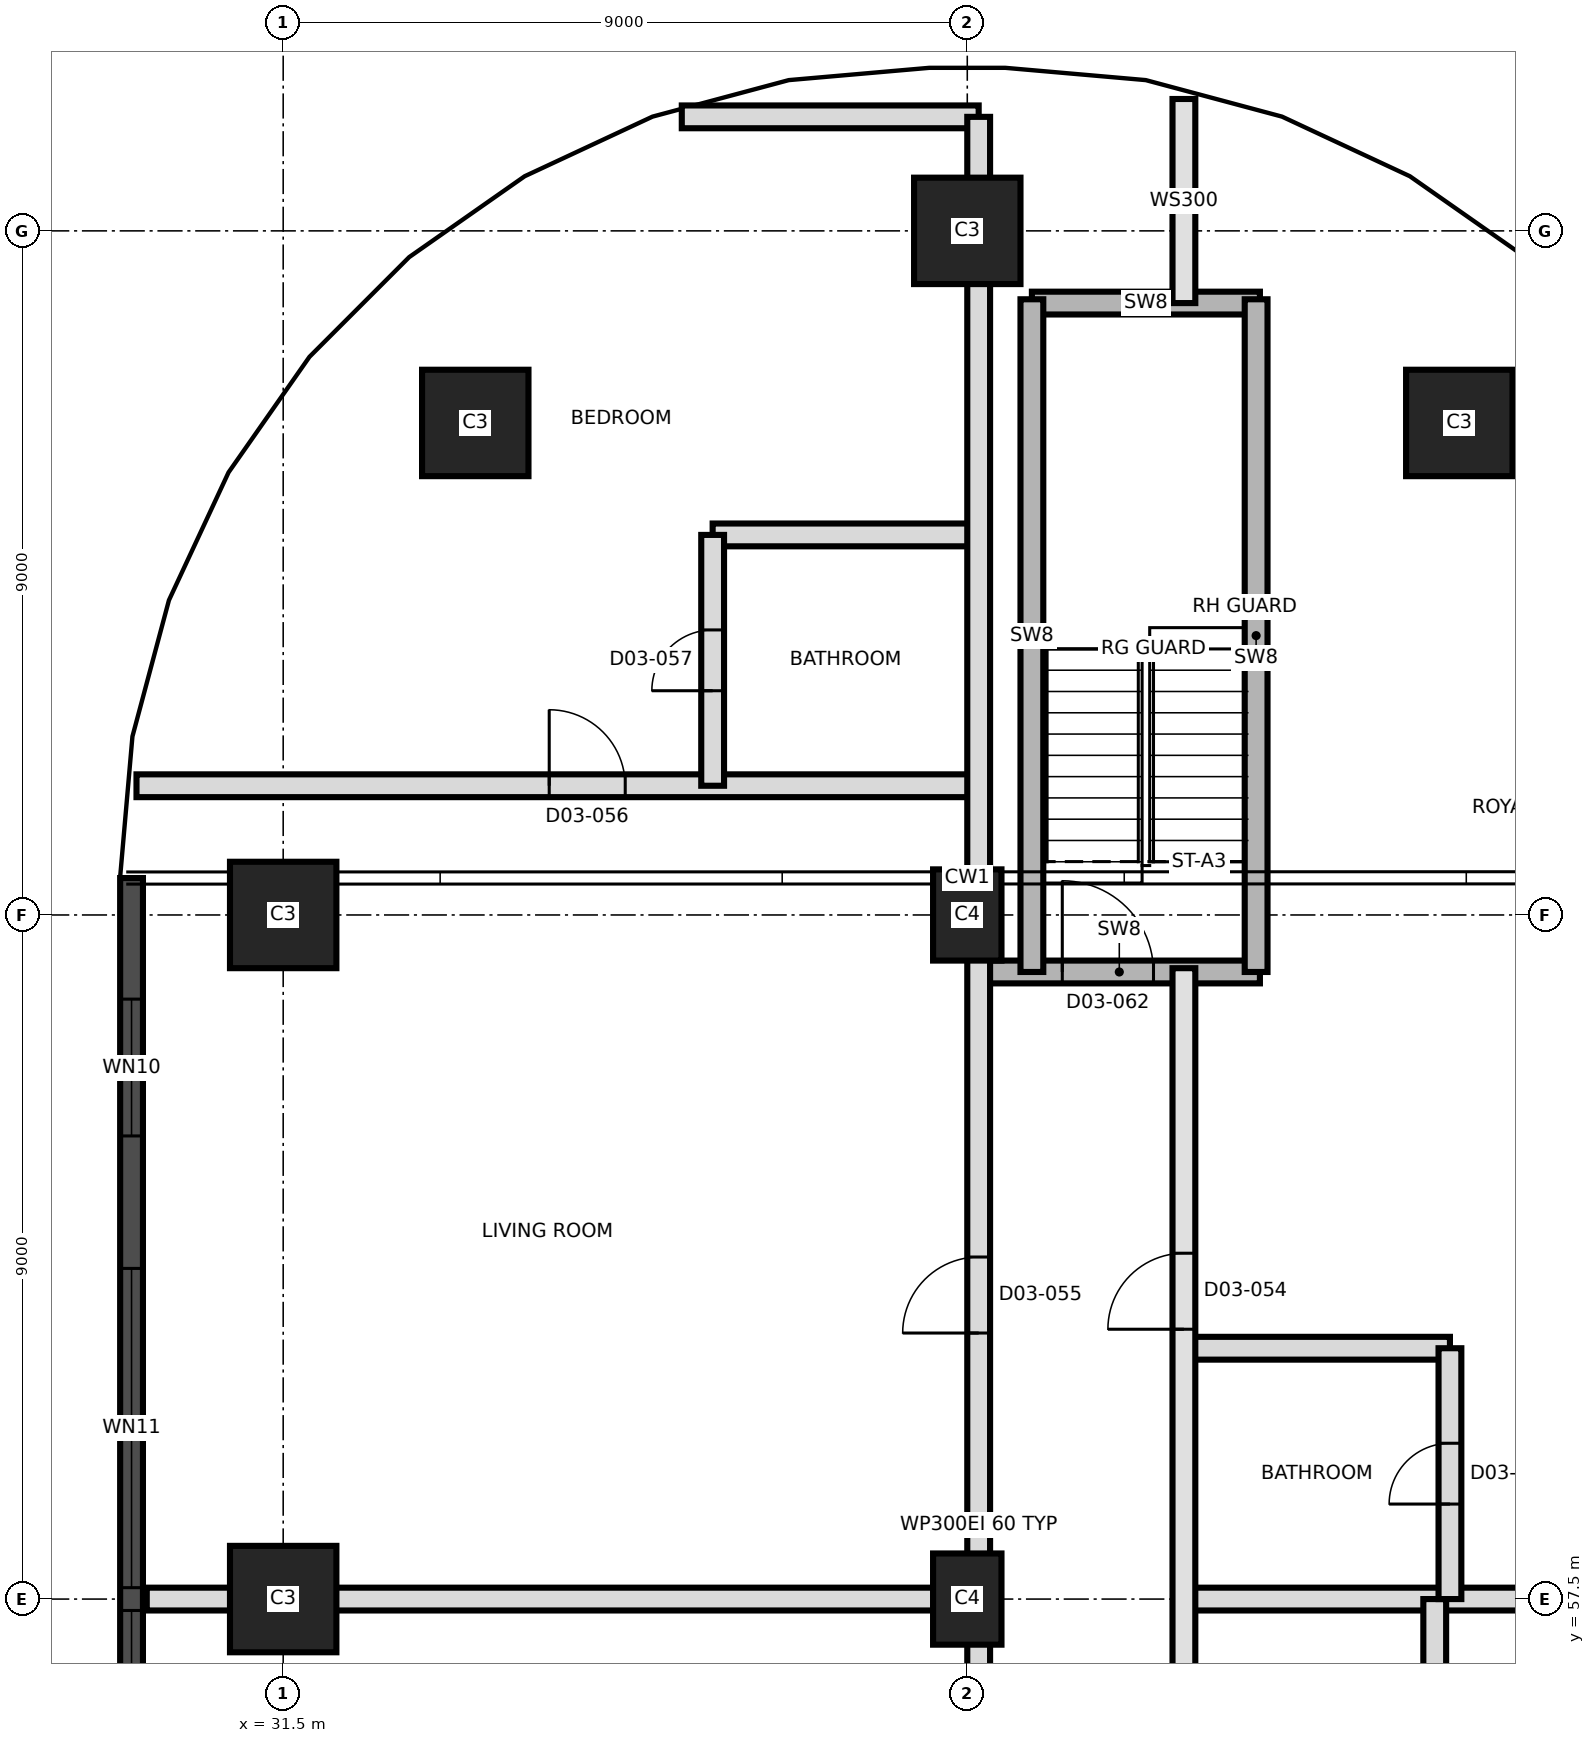
"""IFC4 building model, lengths in metres.
Left out: names, types, materials, properties, quantities, classifications, styles, units other than length and angle.
Written with IfcOpenShell. Run it as: python <this file> out.ifc"""

import sys

from ifc_helpers import new_model, si_unit, direction, frame, frame_2d, origin, origin_2d, place, context, subcontext, project, spatial, rectangle, extrude, element, fill, save


model = new_model("IFC4")
c1 = context("Model", 3, precision=1e-05, world=origin(), true_north=direction((0.0, 1.0)))
c2 = subcontext(c1, "Body", "Model", "MODEL_VIEW")
j1 = project(units=[si_unit("LENGTHUNIT", "METRE"), si_unit("PLANEANGLEUNIT", "RADIAN")], contexts=[c1])
p1 = place(None, origin())
s1 = spatial("IfcSite", under=j1, at=p1, CompositionType="ELEMENT")
p2 = place(p1, origin())
s2 = spatial("IfcBuilding", under=s1, at=p2, CompositionType="ELEMENT")
p3 = place(p2, frame((0.0, 0.0, 59.4)))
s3 = spatial("IfcBuildingStorey", under=s2, at=p3, CompositionType="ELEMENT", Elevation=59.4)
p4 = place(p3, frame((31.5, 57.5, 0.0), z_axis=(0.0, 0.0, 1.0), x_axis=(1.0, 0.0, 0.0)))
e1 = element("IfcColumn", 1, at=p4, inside=s3, PredefinedType="COLUMN", context=c2, shape_type="SweptSolid", body=[
    extrude(rectangle(XDim=1.4, YDim=1.4, at=origin_2d()), origin(), (0.0, 0.0, 1.0), 3.7),
])
p5 = place(p3, frame((40.5, 57.5, 0.0), z_axis=(0.0, 0.0, 1.0), x_axis=(0.0, 1.0, 0.0)))
e2 = element("IfcColumn", 2, at=p5, inside=s3, PredefinedType="COLUMN", context=c2, shape_type="SweptSolid", body=[
    extrude(rectangle(XDim=1.2, YDim=0.9, at=origin_2d()), origin(), (0.0, 0.0, 1.0), 3.7),
])
p6 = place(p3, frame((31.5, 66.5, 0.0), z_axis=(0.0, 0.0, 1.0), x_axis=(1.0, 0.0, 0.0)))
e3 = element("IfcColumn", 3, at=p6, inside=s3, PredefinedType="COLUMN", context=c2, shape_type="SweptSolid", body=[
    extrude(rectangle(XDim=1.4, YDim=1.4, at=origin_2d()), origin(), (0.0, 0.0, 1.0), 3.7),
])
p7 = place(p3, frame((40.5, 66.5, 0.0), z_axis=(0.0, 0.0, 1.0), x_axis=(0.0, 1.0, 0.0)))
e4 = element("IfcColumn", 4, at=p7, inside=s3, PredefinedType="COLUMN", context=c2, shape_type="SweptSolid", body=[
    extrude(rectangle(XDim=1.2, YDim=0.9, at=origin_2d()), origin(), (0.0, 0.0, 1.0), 3.7),
])
for number, where, z_axis, x_axis in (
    (5, (34.027, 72.973, 0.0), (0.0, 0.0, 1.0), (1.0, 0.0, 0.0)),
    (6, (46.973, 72.973, 0.0), (0.0, 0.0, 1.0), (1.0, 0.0, 0.0)),
    (7, (40.5, 75.5, 0.0), (0.0, 0.0, 1.0), (1.0, 0.0, 0.0)),
):
    element("IfcColumn", number, at=place(p3, frame(where, z_axis=z_axis, x_axis=x_axis)), inside=s3, PredefinedType="COLUMN", context=c2, shape_type="SweptSolid", body=[
        extrude(rectangle(XDim=1.4, YDim=1.4, at=origin_2d()), origin(), (0.0, 0.0, 1.0), 3.7),
    ])
p8 = place(p3, frame((29.505, 66.986, 0.0), z_axis=(0.0, 0.0, 1.0), x_axis=(0.0, -1.0, 0.0)))
e8 = element("IfcWall", 8, at=p8, inside=s3, PredefinedType="SOLIDWALL", context=c2, shape_type="SweptSolid", body=[
    extrude(rectangle(XDim=32.976, YDim=0.3, at=frame_2d((16.488, 0.0))), origin(), (0.0, 0.0, 1.0), 3.4),
])
p9 = place(p8, frame((1.593, 0.0, 0.3)))
e9 = element("IfcOpeningElement", 9, at=p9, cuts=e8, PredefinedType="OPENING", context=c2, shape_type="SweptSolid", body=[
    extrude(rectangle(XDim=1.8, YDim=2.4, at=frame_2d((0.9, 1.2))), frame((0.0, 0.16, 0.0), z_axis=(0.0, -1.0, 0.0), x_axis=(1.0, 0.0, 0.0)), (0.0, 0.0, 1.0), 0.32),
])
p10 = place(p8, frame((5.136, 0.0, 0.9)))
e10 = element("IfcOpeningElement", 10, at=p10, cuts=e8, PredefinedType="OPENING", context=c2, shape_type="SweptSolid", body=[
    extrude(rectangle(XDim=4.2, YDim=1.5, at=frame_2d((2.1, 0.75))), frame((0.0, 0.16, 0.0), z_axis=(0.0, -1.0, 0.0), x_axis=(1.0, 0.0, 0.0)), (0.0, 0.0, 1.0), 0.32),
])
p11 = place(p8, frame((9.636, 0.0, 0.9)))
e11 = element("IfcOpeningElement", 11, at=p11, cuts=e8, PredefinedType="OPENING", context=c2, shape_type="SweptSolid", body=[
    extrude(rectangle(XDim=4.2, YDim=1.5, at=frame_2d((2.1, 0.75))), frame((0.0, 0.16, 0.0), z_axis=(0.0, -1.0, 0.0), x_axis=(1.0, 0.0, 0.0)), (0.0, 0.0, 1.0), 0.32),
])
p12 = place(p8, frame((14.136, 0.0, 0.9)))
e12 = element("IfcOpeningElement", 12, at=p12, cuts=e8, PredefinedType="OPENING", context=c2, shape_type="SweptSolid", body=[
    extrude(rectangle(XDim=4.2, YDim=1.5, at=frame_2d((2.1, 0.75))), frame((0.0, 0.16, 0.0), z_axis=(0.0, -1.0, 0.0), x_axis=(1.0, 0.0, 0.0)), (0.0, 0.0, 1.0), 0.32),
])
p13 = place(p8, frame((18.636, 0.0, 0.9)))
e13 = element("IfcOpeningElement", 13, at=p13, cuts=e8, PredefinedType="OPENING", context=c2, shape_type="SweptSolid", body=[
    extrude(rectangle(XDim=4.2, YDim=1.5, at=frame_2d((2.1, 0.75))), frame((0.0, 0.16, 0.0), z_axis=(0.0, -1.0, 0.0), x_axis=(1.0, 0.0, 0.0)), (0.0, 0.0, 1.0), 0.32),
])
p14 = place(p8, frame((23.136, 0.0, 0.9)))
e14 = element("IfcOpeningElement", 14, at=p14, cuts=e8, PredefinedType="OPENING", context=c2, shape_type="SweptSolid", body=[
    extrude(rectangle(XDim=4.2, YDim=1.5, at=frame_2d((2.1, 0.75))), frame((0.0, 0.16, 0.0), z_axis=(0.0, -1.0, 0.0), x_axis=(1.0, 0.0, 0.0)), (0.0, 0.0, 1.0), 0.32),
])
p15 = place(p8, frame((29.331, 0.0, 0.3)))
e15 = element("IfcOpeningElement", 15, at=p15, cuts=e8, PredefinedType="OPENING", context=c2, shape_type="SweptSolid", body=[
    extrude(rectangle(XDim=1.8, YDim=2.4, at=frame_2d((0.9, 1.2))), frame((0.0, 0.16, 0.0), z_axis=(0.0, -1.0, 0.0), x_axis=(1.0, 0.0, 0.0)), (0.0, 0.0, 1.0), 0.32),
])
p16 = place(p3, frame((29.705, 57.5, 0.0), z_axis=(0.0, 0.0, 1.0), x_axis=(1.0, 0.0, 0.0)))
e16 = element("IfcWall", 16, at=p16, inside=s3, PredefinedType="PARTITIONING", context=c2, shape_type="SweptSolid", body=[
    extrude(rectangle(XDim=10.945, YDim=0.3, at=frame_2d((5.472, 0.0))), origin(), (0.0, 0.0, 1.0), 3.4),
])
p17 = place(p3, frame((43.35, 57.5, 0.0), z_axis=(0.0, 0.0, 1.0), x_axis=(1.0, 0.0, 0.0)))
e17 = element("IfcWall", 17, at=p17, inside=s3, PredefinedType="PARTITIONING", context=c2, shape_type="SweptSolid", body=[
    extrude(rectangle(XDim=8.125, YDim=0.3, at=frame_2d((4.062, 0.0))), origin(), (0.0, 0.0, 1.0), 3.4),
])
p18 = place(p3, frame((43.35, 60.8, 0.0), z_axis=(0.0, 0.0, 1.0), x_axis=(1.0, 0.0, 0.0)))
e18 = element("IfcWall", 18, at=p18, inside=s3, PredefinedType="PARTITIONING", context=c2, shape_type="SweptSolid", body=[
    extrude(rectangle(XDim=3.5, YDim=0.3, at=frame_2d((1.75, 0.0))), origin(), (0.0, 0.0, 1.0), 3.4),
])
p19 = place(p3, frame((40.65, 65.75, 0.0), z_axis=(0.0, 0.0, 1.0), x_axis=(1.0, 0.0, 0.0)))
e19 = element("IfcWall", 19, at=p19, inside=s3, PredefinedType="SHEAR", context=c2, shape_type="SweptSolid", body=[
    extrude(rectangle(XDim=3.7, YDim=0.3, at=frame_2d((1.85, 0.0))), origin(), (0.0, 0.0, 1.0), 3.4),
])
p20 = place(p19, frame((1.1, 0.0, 0.0)))
e20 = element("IfcOpeningElement", 20, at=p20, cuts=e19, PredefinedType="OPENING", context=c2, shape_type="SweptSolid", body=[
    extrude(rectangle(XDim=1.2, YDim=2.1, at=frame_2d((0.6, 1.05))), frame((0.0, 0.16, 0.0), z_axis=(0.0, -1.0, 0.0), x_axis=(1.0, 0.0, 0.0)), (0.0, 0.0, 1.0), 0.32),
])
p21 = place(p3, frame((29.57, 68.2, 0.0), z_axis=(0.0, 0.0, 1.0), x_axis=(1.0, 0.0, 0.0)))
e21 = element("IfcWall", 21, at=p21, inside=s3, PredefinedType="PARTITIONING", context=c2, shape_type="SweptSolid", body=[
    extrude(rectangle(XDim=11.08, YDim=0.3, at=frame_2d((5.54, 0.0))), origin(), (0.0, 0.0, 1.0), 3.4),
])
p22 = place(p21, frame((5.43, 0.0, 0.0)))
e22 = element("IfcOpeningElement", 22, at=p22, cuts=e21, PredefinedType="OPENING", context=c2, shape_type="SweptSolid", body=[
    extrude(rectangle(XDim=1.0, YDim=2.1, at=frame_2d((0.5, 1.05))), frame((0.0, 0.16, 0.0), z_axis=(0.0, -1.0, 0.0), x_axis=(1.0, 0.0, 0.0)), (0.0, 0.0, 1.0), 0.32),
])
p23 = place(p3, frame((37.15, 71.5, 0.0), z_axis=(0.0, 0.0, 1.0), x_axis=(1.0, 0.0, 0.0)))
e23 = element("IfcWall", 23, at=p23, inside=s3, PredefinedType="PARTITIONING", context=c2, shape_type="SweptSolid", body=[
    extrude(rectangle(XDim=3.5, YDim=0.3, at=frame_2d((1.75, 0.0))), origin(), (0.0, 0.0, 1.0), 3.4),
])
p24 = place(p3, frame((41.35, 74.55, 0.0), z_axis=(0.0, 0.0, 1.0), x_axis=(1.0, 0.0, 0.0)))
e24 = element("IfcWall", 24, at=p24, inside=s3, PredefinedType="SHEAR", context=c2, shape_type="SweptSolid", body=[
    extrude(rectangle(XDim=3.0, YDim=0.3, at=frame_2d((1.5, 0.0))), origin(), (0.0, 0.0, 1.0), 3.4),
])
p25 = place(p3, frame((36.744, 77.0, 0.0), z_axis=(0.0, 0.0, 1.0), x_axis=(1.0, 0.0, 0.0)))
e25 = element("IfcWall", 25, at=p25, inside=s3, PredefinedType="PARTITIONING", context=c2, shape_type="SweptSolid", body=[
    extrude(rectangle(XDim=3.906, YDim=0.3, at=frame_2d((1.953, 0.0))), origin(), (0.0, 0.0, 1.0), 3.4),
])
p26 = place(p3, frame((37.15, 68.2, 0.0), z_axis=(0.0, 0.0, 1.0), x_axis=(0.0, 1.0, 0.0)))
e26 = element("IfcWall", 26, at=p26, inside=s3, PredefinedType="PARTITIONING", context=c2, shape_type="SweptSolid", body=[
    extrude(rectangle(XDim=3.3, YDim=0.3, at=frame_2d((1.65, 0.0))), origin(), (0.0, 0.0, 1.0), 3.4),
])
p27 = place(p26, frame((1.25, 0.0, 0.0)))
e27 = element("IfcOpeningElement", 27, at=p27, cuts=e26, PredefinedType="OPENING", context=c2, shape_type="SweptSolid", body=[
    extrude(rectangle(XDim=0.8, YDim=2.1, at=frame_2d((0.4, 1.05))), frame((0.0, 0.16, 0.0), z_axis=(0.0, -1.0, 0.0), x_axis=(1.0, 0.0, 0.0)), (0.0, 0.0, 1.0), 0.32),
])
p28 = place(p3, frame((40.65, 39.95, 0.0), z_axis=(0.0, 0.0, 1.0), x_axis=(0.0, 1.0, 0.0)))
e28 = element("IfcWall", 28, at=p28, inside=s3, PredefinedType="PARTITIONING", context=c2, shape_type="SweptSolid", body=[
    extrude(rectangle(XDim=37.05, YDim=0.3, at=frame_2d((18.525, 0.0))), origin(), (0.0, 0.0, 1.0), 3.4),
])
p29 = place(p28, frame((1.9, 0.0, 0.0)))
e29 = element("IfcOpeningElement", 29, at=p29, cuts=e28, PredefinedType="OPENING", context=c2, shape_type="SweptSolid", body=[
    extrude(rectangle(XDim=1.0, YDim=2.4, at=frame_2d((0.5, 1.2))), frame((0.0, 0.16, 0.0), z_axis=(0.0, -1.0, 0.0), x_axis=(1.0, 0.0, 0.0)), (0.0, 0.0, 1.0), 0.32),
])
p30 = place(p28, frame((14.2, 0.0, 0.0)))
e30 = element("IfcOpeningElement", 30, at=p30, cuts=e28, PredefinedType="OPENING", context=c2, shape_type="SweptSolid", body=[
    extrude(rectangle(XDim=1.0, YDim=2.4, at=frame_2d((0.5, 1.2))), frame((0.0, 0.16, 0.0), z_axis=(0.0, -1.0, 0.0), x_axis=(1.0, 0.0, 0.0)), (0.0, 0.0, 1.0), 0.32),
])
p31 = place(p28, frame((21.05, 0.0, 0.0)))
e31 = element("IfcOpeningElement", 31, at=p31, cuts=e28, PredefinedType="OPENING", context=c2, shape_type="SweptSolid", body=[
    extrude(rectangle(XDim=1.0, YDim=2.4, at=frame_2d((0.5, 1.2))), frame((0.0, 0.16, 0.0), z_axis=(0.0, -1.0, 0.0), x_axis=(1.0, 0.0, 0.0)), (0.0, 0.0, 1.0), 0.32),
])
p32 = place(p3, frame((41.35, 65.75, 0.0), z_axis=(0.0, 0.0, 1.0), x_axis=(0.0, 1.0, 0.0)))
e32 = element("IfcWall", 32, at=p32, inside=s3, PredefinedType="SHEAR", context=c2, shape_type="SweptSolid", body=[
    extrude(rectangle(XDim=8.85, YDim=0.3, at=frame_2d((4.425, 0.0))), origin(), (0.0, 0.0, 1.0), 3.4),
])
p33 = place(p3, frame((43.35, 39.95, 0.0), z_axis=(0.0, 0.0, 1.0), x_axis=(0.0, 1.0, 0.0)))
e33 = element("IfcWall", 33, at=p33, inside=s3, PredefinedType="SOLIDWALL", context=c2, shape_type="SweptSolid", body=[
    extrude(rectangle(XDim=25.85, YDim=0.3, at=frame_2d((12.925, 0.0))), origin(), (0.0, 0.0, 1.0), 3.4),
])
p34 = place(p33, frame((0.7, 0.0, 0.0)))
e34 = element("IfcOpeningElement", 34, at=p34, cuts=e33, PredefinedType="OPENING", context=c2, shape_type="SweptSolid", body=[
    extrude(rectangle(XDim=1.0, YDim=2.1, at=frame_2d((0.5, 1.05))), frame((0.0, 0.16, 0.0), z_axis=(0.0, -1.0, 0.0), x_axis=(1.0, 0.0, 0.0)), (0.0, 0.0, 1.0), 0.32),
])
p35 = place(p33, frame((6.55, 0.0, 0.0)))
e35 = element("IfcOpeningElement", 35, at=p35, cuts=e33, PredefinedType="OPENING", context=c2, shape_type="SweptSolid", body=[
    extrude(rectangle(XDim=1.0, YDim=2.1, at=frame_2d((0.5, 1.05))), frame((0.0, 0.16, 0.0), z_axis=(0.0, -1.0, 0.0), x_axis=(1.0, 0.0, 0.0)), (0.0, 0.0, 1.0), 0.32),
])
p36 = place(p33, frame((12.55, 0.0, 0.0)))
e36 = element("IfcOpeningElement", 36, at=p36, cuts=e33, PredefinedType="OPENING", context=c2, shape_type="SweptSolid", body=[
    extrude(rectangle(XDim=1.0, YDim=2.4, at=frame_2d((0.5, 1.2))), frame((0.0, 0.16, 0.0), z_axis=(0.0, -1.0, 0.0), x_axis=(1.0, 0.0, 0.0)), (0.0, 0.0, 1.0), 0.32),
])
p37 = place(p33, frame((21.1, 0.0, 0.0)))
e37 = element("IfcOpeningElement", 37, at=p37, cuts=e33, PredefinedType="OPENING", context=c2, shape_type="SweptSolid", body=[
    extrude(rectangle(XDim=1.0, YDim=2.4, at=frame_2d((0.5, 1.2))), frame((0.0, 0.16, 0.0), z_axis=(0.0, -1.0, 0.0), x_axis=(1.0, 0.0, 0.0)), (0.0, 0.0, 1.0), 0.32),
])
p38 = place(p3, frame((43.35, 74.55, 0.0), z_axis=(0.0, 0.0, 1.0), x_axis=(0.0, 1.0, 0.0)))
e38 = element("IfcWall", 38, at=p38, inside=s3, PredefinedType="SOLIDWALL", context=c2, shape_type="SweptSolid", body=[
    extrude(rectangle(XDim=2.685, YDim=0.3, at=frame_2d((1.343, 0.0))), origin(), (0.0, 0.0, 1.0), 3.4),
])
p39 = place(p3, frame((44.3, 65.75, 0.0), z_axis=(0.0, 0.0, 1.0), x_axis=(0.0, 1.0, 0.0)))
e39 = element("IfcWall", 39, at=p39, inside=s3, PredefinedType="SHEAR", context=c2, shape_type="SweptSolid", body=[
    extrude(rectangle(XDim=8.85, YDim=0.3, at=frame_2d((4.425, 0.0))), origin(), (0.0, 0.0, 1.0), 3.4),
])
p40 = place(p3, frame((46.65, 54.5, 0.0), z_axis=(0.0, 0.0, 1.0), x_axis=(0.0, 1.0, 0.0)))
e40 = element("IfcWall", 40, at=p40, inside=s3, PredefinedType="PARTITIONING", context=c2, shape_type="SweptSolid", body=[
    extrude(rectangle(XDim=3.0, YDim=0.3, at=frame_2d((1.5, 0.0))), origin(), (0.0, 0.0, 1.0), 3.4),
])
p41 = place(p40, frame((1.1, 0.0, 0.0)))
e41 = element("IfcOpeningElement", 41, at=p41, cuts=e40, PredefinedType="OPENING", context=c2, shape_type="SweptSolid", body=[
    extrude(rectangle(XDim=0.8, YDim=2.1, at=frame_2d((0.4, 1.05))), frame((0.0, 0.16, 0.0), z_axis=(0.0, -1.0, 0.0), x_axis=(1.0, 0.0, 0.0)), (0.0, 0.0, 1.0), 0.32),
])
p42 = place(p3, frame((46.85, 57.5, 0.0), z_axis=(0.0, 0.0, 1.0), x_axis=(0.0, 1.0, 0.0)))
e42 = element("IfcWall", 42, at=p42, inside=s3, PredefinedType="PARTITIONING", context=c2, shape_type="SweptSolid", body=[
    extrude(rectangle(XDim=3.3, YDim=0.3, at=frame_2d((1.65, 0.0))), origin(), (0.0, 0.0, 1.0), 3.4),
])
p43 = place(p42, frame((1.25, 0.0, 0.0)))
e43 = element("IfcOpeningElement", 43, at=p43, cuts=e42, PredefinedType="OPENING", context=c2, shape_type="SweptSolid", body=[
    extrude(rectangle(XDim=0.8, YDim=2.1, at=frame_2d((0.4, 1.05))), frame((0.0, 0.16, 0.0), z_axis=(0.0, -1.0, 0.0), x_axis=(1.0, 0.0, 0.0)), (0.0, 0.0, 1.0), 0.32),
])
p44 = place(p9, origin())
e44 = element("IfcWindow", 44, at=p44, inside=s3, PartitioningType="SINGLE_PANEL", PredefinedType="WINDOW", context=c2, shape_type="SweptSolid", body=[
    extrude(rectangle(XDim=1.8, YDim=2.4, at=frame_2d((0.9, 1.2))), frame((0.0, 0.03, 0.0), z_axis=(0.0, -1.0, 0.0), x_axis=(1.0, 0.0, 0.0)), (0.0, 0.0, 1.0), 0.06),
])
fill(e9, e44)
p45 = place(p10, origin())
e45 = element("IfcWindow", 45, at=p45, inside=s3, PartitioningType="SINGLE_PANEL", PredefinedType="WINDOW", context=c2, shape_type="SweptSolid", body=[
    extrude(rectangle(XDim=4.2, YDim=1.5, at=frame_2d((2.1, 0.75))), frame((0.0, 0.03, 0.0), z_axis=(0.0, -1.0, 0.0), x_axis=(1.0, 0.0, 0.0)), (0.0, 0.0, 1.0), 0.06),
])
fill(e10, e45)
p46 = place(p11, origin())
e46 = element("IfcWindow", 46, at=p46, inside=s3, PartitioningType="SINGLE_PANEL", PredefinedType="WINDOW", context=c2, shape_type="SweptSolid", body=[
    extrude(rectangle(XDim=4.2, YDim=1.5, at=frame_2d((2.1, 0.75))), frame((0.0, 0.03, 0.0), z_axis=(0.0, -1.0, 0.0), x_axis=(1.0, 0.0, 0.0)), (0.0, 0.0, 1.0), 0.06),
])
fill(e11, e46)
p47 = place(p43, origin())
e47 = element("IfcDoor", 47, at=p47, inside=s3, OperationType="SINGLE_SWING_LEFT", PredefinedType="DOOR", context=c2, shape_type="SweptSolid", body=[
    extrude(rectangle(XDim=0.8, YDim=2.1, at=frame_2d((0.4, 1.05))), frame((0.0, 0.025, 0.0), z_axis=(0.0, -1.0, 0.0), x_axis=(1.0, 0.0, 0.0)), (0.0, 0.0, 1.0), 0.05),
])
fill(e43, e47)
p48 = place(p37, origin())
e48 = element("IfcDoor", 48, at=p48, inside=s3, OperationType="SINGLE_SWING_LEFT", PredefinedType="DOOR", context=c2, shape_type="SweptSolid", body=[
    extrude(rectangle(XDim=1.0, YDim=2.4, at=frame_2d((0.5, 1.2))), frame((0.0, 0.025, 0.0), z_axis=(0.0, -1.0, 0.0), x_axis=(1.0, 0.0, 0.0)), (0.0, 0.0, 1.0), 0.05),
])
fill(e37, e48)
p49 = place(p31, origin())
e49 = element("IfcDoor", 49, at=p49, inside=s3, OperationType="SINGLE_SWING_RIGHT", PredefinedType="DOOR", context=c2, shape_type="SweptSolid", body=[
    extrude(rectangle(XDim=1.0, YDim=2.4, at=frame_2d((0.5, 1.2))), frame((0.0, 0.025, 0.0), z_axis=(0.0, -1.0, 0.0), x_axis=(1.0, 0.0, 0.0)), (0.0, 0.0, 1.0), 0.05),
])
fill(e31, e49)
p50 = place(p22, origin())
e50 = element("IfcDoor", 50, at=p50, inside=s3, OperationType="SINGLE_SWING_LEFT", PredefinedType="DOOR", context=c2, shape_type="SweptSolid", body=[
    extrude(rectangle(XDim=1.0, YDim=2.1, at=frame_2d((0.5, 1.05))), frame((0.0, 0.025, 0.0), z_axis=(0.0, -1.0, 0.0), x_axis=(1.0, 0.0, 0.0)), (0.0, 0.0, 1.0), 0.05),
])
fill(e22, e50)
p51 = place(p27, origin())
e51 = element("IfcDoor", 51, at=p51, inside=s3, OperationType="SINGLE_SWING_LEFT", PredefinedType="DOOR", context=c2, shape_type="SweptSolid", body=[
    extrude(rectangle(XDim=0.8, YDim=2.1, at=frame_2d((0.4, 1.05))), frame((0.0, 0.025, 0.0), z_axis=(0.0, -1.0, 0.0), x_axis=(1.0, 0.0, 0.0)), (0.0, 0.0, 1.0), 0.05),
])
fill(e27, e51)
p52 = place(p20, origin())
e52 = element("IfcDoor", 52, at=p52, inside=s3, OperationType="SINGLE_SWING_RIGHT", PredefinedType="DOOR", context=c2, shape_type="SweptSolid", body=[
    extrude(rectangle(XDim=1.2, YDim=2.1, at=frame_2d((0.6, 1.05))), frame((0.0, 0.025, 0.0), z_axis=(0.0, -1.0, 0.0), x_axis=(1.0, 0.0, 0.0)), (0.0, 0.0, 1.0), 0.05),
])
fill(e20, e52)
save(model, sys.argv[1])
